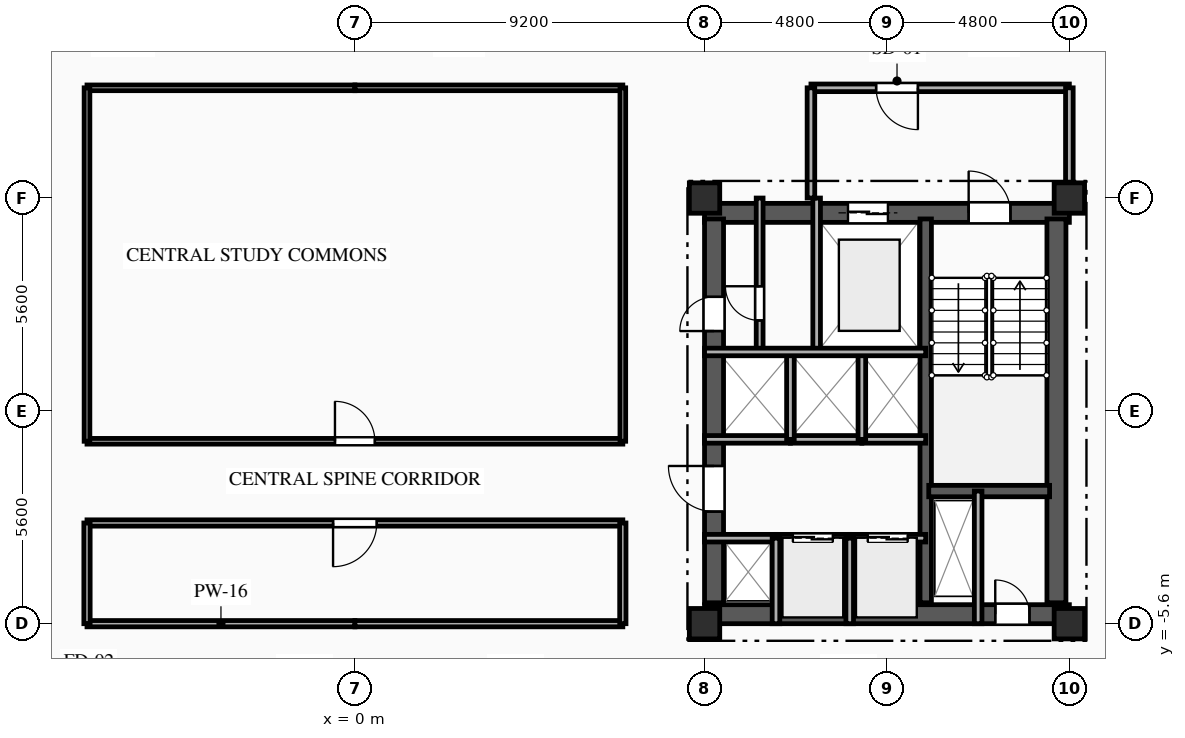
"""IFC4 building model, lengths in metres.
Left out: names, types, materials, properties, quantities, classifications, styles, units other than length and angle.
Written with IfcOpenShell. Run it as: python <this file> out.ifc"""

import sys

from ifc_helpers import new_model, si_unit, direction, frame, frame_2d, origin, origin_2d, place, context, subcontext, project, spatial, rectangle, extrude, element, fill, save


model = new_model("IFC4")
c1 = context("Model", 3, precision=1e-05, world=origin(), true_north=direction((0.0, 1.0)))
c2 = subcontext(c1, "Body", "Model", "MODEL_VIEW")
j1 = project(units=[si_unit("LENGTHUNIT", "METRE"), si_unit("PLANEANGLEUNIT", "RADIAN")], contexts=[c1])
p1 = place(None, origin())
s1 = spatial("IfcSite", under=j1, at=p1, CompositionType="ELEMENT")
p2 = place(p1, origin())
s2 = spatial("IfcBuilding", under=s1, at=p2, CompositionType="ELEMENT")
p3 = place(p2, frame((0.0, 0.0, 219.85)))
s3 = spatial("IfcBuildingStorey", under=s2, at=p3, CompositionType="ELEMENT", Elevation=219.85)
for number, where, z_axis, x_axis in (
    (1, (9.2, -5.6, 0.0), (0.0, 0.0, 1.0), (1.0, 0.0, 0.0)),
    (2, (9.2, 5.6, 0.0), (0.0, 0.0, 1.0), (1.0, 0.0, 0.0)),
    (3, (18.8, -5.6, 0.0), (0.0, 0.0, 1.0), (1.0, 0.0, 0.0)),
    (4, (18.8, 5.6, 0.0), (0.0, 0.0, 1.0), (1.0, 0.0, 0.0)),
):
    element("IfcColumn", number, at=place(p3, frame(where, z_axis=z_axis, x_axis=x_axis)), inside=s3, PredefinedType="COLUMN", context=c2, shape_type="SweptSolid", body=[
        extrude(rectangle(XDim=0.8, YDim=0.8, at=origin_2d()), origin(), (0.0, 0.0, 1.0), 3.35),
    ])
p4 = place(p3, frame((9.2, 5.21, 0.0), z_axis=(0.0, 0.0, 1.0), x_axis=(1.0, 0.0, 0.0)))
e5 = element("IfcWall", 5, at=p4, inside=s3, PredefinedType="SHEAR", context=c2, shape_type="SweptSolid", body=[
    extrude(rectangle(XDim=9.6, YDim=0.5, at=frame_2d((4.8, 0.0))), origin(), (0.0, 0.0, 1.0), 3.0),
])
p5 = place(p4, frame((6.95, 0.0, 0.0)))
e6 = element("IfcOpeningElement", 6, at=p5, cuts=e5, PredefinedType="OPENING", context=c2, shape_type="SweptSolid", body=[
    extrude(rectangle(XDim=1.1, YDim=2.15, at=frame_2d((0.55, 1.075))), frame((0.0, 0.26, 0.0), z_axis=(0.0, -1.0, 0.0), x_axis=(1.0, 0.0, 0.0)), (0.0, 0.0, 1.0), 0.52),
])
p6 = place(p4, frame((3.775, 0.0, 0.0)))
e7 = element("IfcOpeningElement", 7, at=p6, cuts=e5, PredefinedType="OPENING", context=c2, shape_type="SweptSolid", body=[
    extrude(rectangle(XDim=1.05, YDim=2.1, at=frame_2d((0.525, 1.05))), frame((0.0, 0.26, 0.0), z_axis=(0.0, -1.0, 0.0), x_axis=(1.0, 0.0, 0.0)), (0.0, 0.0, 1.0), 0.52),
])
p7 = place(p3, frame((9.2, -5.35, 0.0), z_axis=(0.0, 0.0, 1.0), x_axis=(1.0, 0.0, 0.0)))
e8 = element("IfcWall", 8, at=p7, inside=s3, PredefinedType="SHEAR", context=c2, shape_type="SweptSolid", body=[
    extrude(rectangle(XDim=9.6, YDim=0.5, at=frame_2d((4.8, 0.0))), origin(), (0.0, 0.0, 1.0), 3.0),
])
p8 = place(p7, frame((7.65, 0.0, 0.0)))
e9 = element("IfcOpeningElement", 9, at=p8, cuts=e8, PredefinedType="OPENING", context=c2, shape_type="SweptSolid", body=[
    extrude(rectangle(XDim=0.9, YDim=2.1, at=frame_2d((0.45, 1.05))), frame((0.0, 0.26, 0.0), z_axis=(0.0, -1.0, 0.0), x_axis=(1.0, 0.0, 0.0)), (0.0, 0.0, 1.0), 0.52),
])
p9 = place(p3, frame((9.45, -5.05, 0.0), z_axis=(0.0, 0.0, 1.0), x_axis=(0.0, 1.0, 0.0)))
e10 = element("IfcWall", 10, at=p9, inside=s3, PredefinedType="SHEAR", context=c2, shape_type="SweptSolid", body=[
    extrude(rectangle(XDim=10.1, YDim=0.5, at=frame_2d((5.05, 0.0))), origin(), (0.0, 0.0, 1.0), 3.0),
])
p10 = place(p9, frame((7.15, 0.0, 0.0)))
e11 = element("IfcOpeningElement", 11, at=p10, cuts=e10, PredefinedType="OPENING", context=c2, shape_type="SweptSolid", body=[
    extrude(rectangle(XDim=0.9, YDim=2.1, at=frame_2d((0.45, 1.05))), frame((0.0, 0.26, 0.0), z_axis=(0.0, -1.0, 0.0), x_axis=(1.0, 0.0, 0.0)), (0.0, 0.0, 1.0), 0.52),
])
p11 = place(p9, frame((2.4, 0.0, 0.0)))
e12 = element("IfcOpeningElement", 12, at=p11, cuts=e10, PredefinedType="OPENING", context=c2, shape_type="SweptSolid", body=[
    extrude(rectangle(XDim=1.2, YDim=2.15, at=frame_2d((0.6, 1.075))), frame((0.0, 0.26, 0.0), z_axis=(0.0, -1.0, 0.0), x_axis=(1.0, 0.0, 0.0)), (0.0, 0.0, 1.0), 0.52),
])
p12 = place(p3, frame((18.46, -5.05, 0.0), z_axis=(0.0, 0.0, 1.0), x_axis=(0.0, 1.0, 0.0)))
e13 = element("IfcWall", 13, at=p12, inside=s3, PredefinedType="SHEAR", context=c2, shape_type="SweptSolid", body=[
    extrude(rectangle(XDim=10.1, YDim=0.5, at=frame_2d((5.05, 0.0))), origin(), (0.0, 0.0, 1.0), 3.0),
])
p13 = place(p3, frame((15.02, -5.05, 0.0), z_axis=(0.0, 0.0, 1.0), x_axis=(0.0, 1.0, 0.0)))
e14 = element("IfcWall", 14, at=p13, inside=s3, PredefinedType="SHEAR", context=c2, shape_type="SweptSolid", body=[
    extrude(rectangle(XDim=10.1, YDim=0.3, at=frame_2d((5.05, 0.0))), origin(), (0.0, 0.0, 1.0), 3.0),
])
p14 = place(p3, frame((15.1, -2.11, 0.0), z_axis=(0.0, 0.0, 1.0), x_axis=(1.0, 0.0, 0.0)))
e15 = element("IfcWall", 15, at=p14, inside=s3, PredefinedType="SHEAR", context=c2, shape_type="SweptSolid", body=[
    extrude(rectangle(XDim=3.18, YDim=0.3, at=frame_2d((1.59, 0.0))), origin(), (0.0, 0.0, 1.0), 3.0),
])
p15 = place(p3, frame((16.4, -2.11, 0.0), z_axis=(0.0, 0.0, 1.0), x_axis=(0.0, -1.0, 0.0)))
e16 = element("IfcWall", 16, at=p15, inside=s3, PredefinedType="PARTITIONING", context=c2, shape_type="SweptSolid", body=[
    extrude(rectangle(XDim=3.49, YDim=0.2, at=frame_2d((1.745, 0.0))), origin(), (0.0, 0.0, 1.0), 3.0),
])
p16 = place(p3, frame((12.15, 5.6, 0.0), z_axis=(0.0, 0.0, 1.0), x_axis=(0.0, -1.0, 0.0)))
e17 = element("IfcWall", 17, at=p16, inside=s3, PredefinedType="PARTITIONING", context=c2, shape_type="SweptSolid", body=[
    extrude(rectangle(XDim=4.05, YDim=0.2, at=frame_2d((2.025, 0.0))), origin(), (0.0, 0.0, 1.0), 3.0),
])
p17 = place(p3, frame((18.8, 8.5, 0.0), z_axis=(0.0, 0.0, 1.0), x_axis=(-1.0, 0.0, 0.0)))
e18 = element("IfcWall", 18, at=p17, inside=s3, PredefinedType="PARTITIONING", context=c2, shape_type="SweptSolid", body=[
    extrude(rectangle(XDim=6.8, YDim=0.2, at=frame_2d((3.4, 0.0))), origin(), (0.0, 0.0, 1.0), 3.0),
])
p18 = place(p17, frame((3.985, 0.0, 0.0)))
e19 = element("IfcOpeningElement", 19, at=p18, cuts=e18, PredefinedType="OPENING", context=c2, shape_type="SweptSolid", body=[
    extrude(rectangle(XDim=1.1, YDim=2.15, at=frame_2d((0.55, 1.075))), frame((0.0, 0.11, 0.0), z_axis=(0.0, -1.0, 0.0), x_axis=(1.0, 0.0, 0.0)), (0.0, 0.0, 1.0), 0.22),
])
p19 = place(p3, frame((18.8, 5.6, 0.0), z_axis=(0.0, 0.0, 1.0), x_axis=(0.0, 1.0, 0.0)))
e20 = element("IfcWall", 20, at=p19, inside=s3, PredefinedType="PARTITIONING", context=c2, shape_type="SweptSolid", body=[
    extrude(rectangle(XDim=2.9, YDim=0.2, at=frame_2d((1.45, 0.0))), origin(), (0.0, 0.0, 1.0), 2.625),
])
p20 = place(p3, frame((12.0, 8.5, 0.0), z_axis=(0.0, 0.0, 1.0), x_axis=(0.0, -1.0, 0.0)))
e21 = element("IfcWall", 21, at=p20, inside=s3, PredefinedType="PARTITIONING", context=c2, shape_type="SweptSolid", body=[
    extrude(rectangle(XDim=2.9, YDim=0.2, at=frame_2d((1.45, 0.0))), origin(), (0.0, 0.0, 1.0), 3.0),
])
p21 = place(p3, frame((10.65, 1.55, 0.0), z_axis=(0.0, 0.0, 1.0), x_axis=(0.0, 1.0, 0.0)))
e22 = element("IfcWall", 22, at=p21, inside=s3, PredefinedType="PARTITIONING", context=c2, shape_type="SweptSolid", body=[
    extrude(rectangle(XDim=4.05, YDim=0.18, at=frame_2d((2.025, 0.0))), origin(), (0.0, 0.0, 1.0), 3.0),
])
p22 = place(p21, frame((0.829, 0.0, 0.0)))
e23 = element("IfcOpeningElement", 23, at=p22, cuts=e22, PredefinedType="OPENING", context=c2, shape_type="SweptSolid", body=[
    extrude(rectangle(XDim=0.9, YDim=2.1, at=frame_2d((0.45, 1.05))), frame((0.0, 0.1, 0.0), z_axis=(0.0, -1.0, 0.0), x_axis=(1.0, 0.0, 0.0)), (0.0, 0.0, 1.0), 0.2),
])
p23 = place(p3, frame((9.2, -3.35, 0.0), z_axis=(0.0, 0.0, 1.0), x_axis=(1.0, 0.0, 0.0)))
e24 = element("IfcWall", 24, at=p23, inside=s3, PredefinedType="PARTITIONING", context=c2, shape_type="SweptSolid", body=[
    extrude(rectangle(XDim=1.88, YDim=0.2, at=frame_2d((0.94, 0.0))), origin(), (0.0, 0.0, 1.0), 2.715),
])
p24 = place(p3, frame((11.08, -3.35, 0.0), z_axis=(0.0, 0.0, 1.0), x_axis=(1.0, 0.0, 0.0)))
e25 = element("IfcWall", 25, at=p24, inside=s3, PredefinedType="PARTITIONING", context=c2, shape_type="SweptSolid", body=[
    extrude(rectangle(XDim=1.94, YDim=0.2, at=frame_2d((0.97, 0.0))), origin(), (0.0, 0.0, 1.0), 3.0),
])
p25 = place(p24, frame((0.445, 0.0, 0.0)))
e26 = element("IfcOpeningElement", 26, at=p25, cuts=e25, PredefinedType="OPENING", context=c2, shape_type="SweptSolid", body=[
    extrude(rectangle(XDim=1.05, YDim=2.1, at=frame_2d((0.525, 1.05))), frame((0.0, 0.11, 0.0), z_axis=(0.0, -1.0, 0.0), x_axis=(1.0, 0.0, 0.0)), (0.0, 0.0, 1.0), 0.22),
])
p26 = place(p3, frame((13.02, -3.35, 0.0), z_axis=(0.0, 0.0, 1.0), x_axis=(1.0, 0.0, 0.0)))
e27 = element("IfcWall", 27, at=p26, inside=s3, PredefinedType="PARTITIONING", context=c2, shape_type="SweptSolid", body=[
    extrude(rectangle(XDim=2.0, YDim=0.2, at=frame_2d((1.0, 0.0))), origin(), (0.0, 0.0, 1.0), 3.0),
])
p27 = place(p26, frame((0.475, 0.0, 0.0)))
e28 = element("IfcOpeningElement", 28, at=p27, cuts=e27, PredefinedType="OPENING", context=c2, shape_type="SweptSolid", body=[
    extrude(rectangle(XDim=1.05, YDim=2.1, at=frame_2d((0.525, 1.05))), frame((0.0, 0.11, 0.0), z_axis=(0.0, -1.0, 0.0), x_axis=(1.0, 0.0, 0.0)), (0.0, 0.0, 1.0), 0.22),
])
p28 = place(p3, frame((11.46, -0.75, 0.0), z_axis=(0.0, 0.0, 1.0), x_axis=(-1.0, 0.0, 0.0)))
e29 = element("IfcWall", 29, at=p28, inside=s3, PredefinedType="PARTITIONING", context=c2, shape_type="SweptSolid", body=[
    extrude(rectangle(XDim=2.26, YDim=0.2, at=frame_2d((1.13, 0.0))), origin(), (0.0, 0.0, 1.0), 3.0),
])
p29 = place(p3, frame((13.34, -0.75, 0.0), z_axis=(0.0, 0.0, 1.0), x_axis=(-1.0, 0.0, 0.0)))
e30 = element("IfcWall", 30, at=p29, inside=s3, PredefinedType="PARTITIONING", context=c2, shape_type="SweptSolid", body=[
    extrude(rectangle(XDim=1.88, YDim=0.2, at=frame_2d((0.94, 0.0))), origin(), (0.0, 0.0, 1.0), 3.0),
])
p30 = place(p3, frame((15.02, -0.75, 0.0), z_axis=(0.0, 0.0, 1.0), x_axis=(-1.0, 0.0, 0.0)))
e31 = element("IfcWall", 31, at=p30, inside=s3, PredefinedType="PARTITIONING", context=c2, shape_type="SweptSolid", body=[
    extrude(rectangle(XDim=1.68, YDim=0.2, at=frame_2d((0.84, 0.0))), origin(), (0.0, 0.0, 1.0), 3.0),
])
for number, where, z_axis, x_axis in (
    (32, (11.08, -5.6, 0.0), (0.0, 0.0, 1.0), (0.0, 1.0, 0.0)),
    (33, (13.02, -5.6, 0.0), (0.0, 0.0, 1.0), (0.0, 1.0, 0.0)),
):
    element("IfcWall", number, at=place(p3, frame(where, z_axis=z_axis, x_axis=x_axis)), inside=s3, PredefinedType="PARTITIONING", context=c2, shape_type="SweptSolid", body=[
        extrude(rectangle(XDim=2.25, YDim=0.2, at=frame_2d((1.125, 0.0))), origin(), (0.0, 0.0, 1.0), 3.0),
    ])
for number, where, z_axis, x_axis in (
    (34, (11.46, -0.75, 0.0), (0.0, 0.0, 1.0), (0.0, 1.0, 0.0)),
    (35, (13.34, -0.75, 0.0), (0.0, 0.0, 1.0), (0.0, 1.0, 0.0)),
):
    element("IfcWall", number, at=place(p3, frame(where, z_axis=z_axis, x_axis=x_axis)), inside=s3, PredefinedType="PARTITIONING", context=c2, shape_type="SweptSolid", body=[
        extrude(rectangle(XDim=2.3, YDim=0.2, at=frame_2d((1.15, 0.0))), origin(), (0.0, 0.0, 1.0), 3.0),
    ])
for number, where, z_axis, x_axis in (
    (36, (0.0, 8.5, 0.0), (0.0, 0.0, 1.0), (-1.0, 0.0, 0.0)),
    (37, (7.05, 8.5, 0.0), (0.0, 0.0, 1.0), (-1.0, 0.0, 0.0)),
):
    element("IfcWall", number, at=place(p3, frame(where, z_axis=z_axis, x_axis=x_axis)), inside=s3, PredefinedType="PARTITIONING", context=c2, shape_type="SweptSolid", body=[
        extrude(rectangle(XDim=7.05, YDim=0.15, at=frame_2d((3.525, 0.0))), origin(), (0.0, 0.0, 1.0), 3.0),
    ])
for number, where, z_axis, x_axis in (
    (38, (-7.05, -5.6, 0.0), (0.0, 0.0, 1.0), (1.0, 0.0, 0.0)),
    (39, (0.0, -5.6, 0.0), (0.0, 0.0, 1.0), (1.0, 0.0, 0.0)),
):
    element("IfcWall", number, at=place(p3, frame(where, z_axis=z_axis, x_axis=x_axis)), inside=s3, PredefinedType="PARTITIONING", context=c2, shape_type="SweptSolid", body=[
        extrude(rectangle(XDim=7.05, YDim=0.165, at=frame_2d((3.525, 0.0))), origin(), (0.0, 0.0, 1.0), 2.485),
    ])
p31 = place(p3, frame((-7.05, -0.8, 0.0), z_axis=(0.0, 0.0, 1.0), x_axis=(1.0, 0.0, 0.0)))
e40 = element("IfcWall", 40, at=p31, inside=s3, PredefinedType="PARTITIONING", context=c2, shape_type="SweptSolid", body=[
    extrude(rectangle(XDim=14.1, YDim=0.15, at=frame_2d((7.05, 0.0))), origin(), (0.0, 0.0, 1.0), 3.0),
])
p32 = place(p31, frame((6.525, 0.0, 0.0)))
e41 = element("IfcOpeningElement", 41, at=p32, cuts=e40, PredefinedType="OPENING", context=c2, shape_type="SweptSolid", body=[
    extrude(rectangle(XDim=1.05, YDim=2.15, at=frame_2d((0.525, 1.075))), frame((0.0, 0.085, 0.0), z_axis=(0.0, -1.0, 0.0), x_axis=(1.0, 0.0, 0.0)), (0.0, 0.0, 1.0), 0.17),
])
p33 = place(p3, frame((7.05, -2.95, 0.0), z_axis=(0.0, 0.0, 1.0), x_axis=(-1.0, 0.0, 0.0)))
e42 = element("IfcWall", 42, at=p33, inside=s3, PredefinedType="PARTITIONING", context=c2, shape_type="SweptSolid", body=[
    extrude(rectangle(XDim=14.1, YDim=0.165, at=frame_2d((7.05, 0.0))), origin(), (0.0, 0.0, 1.0), 3.0),
])
p34 = place(p33, frame((6.475, 0.0, 0.0)))
e43 = element("IfcOpeningElement", 43, at=p34, cuts=e42, PredefinedType="OPENING", context=c2, shape_type="SweptSolid", body=[
    extrude(rectangle(XDim=1.15, YDim=2.15, at=frame_2d((0.575, 1.075))), frame((0.0, 0.093, 0.0), z_axis=(0.0, -1.0, 0.0), x_axis=(1.0, 0.0, 0.0)), (0.0, 0.0, 1.0), 0.185),
])
p35 = place(p3, frame((-7.05, 8.5, 0.0), z_axis=(0.0, 0.0, 1.0), x_axis=(0.0, -1.0, 0.0)))
e44 = element("IfcWall", 44, at=p35, inside=s3, PredefinedType="PARTITIONING", context=c2, shape_type="SweptSolid", body=[
    extrude(rectangle(XDim=9.3, YDim=0.15, at=frame_2d((4.65, 0.0))), origin(), (0.0, 0.0, 1.0), 3.0),
])
p36 = place(p3, frame((-7.05, -2.95, 0.0), z_axis=(0.0, 0.0, 1.0), x_axis=(0.0, -1.0, 0.0)))
e45 = element("IfcWall", 45, at=p36, inside=s3, PredefinedType="PARTITIONING", context=c2, shape_type="SweptSolid", body=[
    extrude(rectangle(XDim=2.65, YDim=0.165, at=frame_2d((1.325, 0.0))), origin(), (0.0, 0.0, 1.0), 3.0),
])
p37 = place(p3, frame((7.05, -0.8, 0.0), z_axis=(0.0, 0.0, 1.0), x_axis=(0.0, 1.0, 0.0)))
e46 = element("IfcWall", 46, at=p37, inside=s3, PredefinedType="PARTITIONING", context=c2, shape_type="SweptSolid", body=[
    extrude(rectangle(XDim=9.3, YDim=0.15, at=frame_2d((4.65, 0.0))), origin(), (0.0, 0.0, 1.0), 3.0),
])
p38 = place(p3, frame((7.05, -5.6, 0.0), z_axis=(0.0, 0.0, 1.0), x_axis=(0.0, 1.0, 0.0)))
e47 = element("IfcWall", 47, at=p38, inside=s3, PredefinedType="PARTITIONING", context=c2, shape_type="SweptSolid", body=[
    extrude(rectangle(XDim=2.65, YDim=0.165, at=frame_2d((1.325, 0.0))), origin(), (0.0, 0.0, 1.0), 3.0),
])
p39 = place(p3, frame((9.2, 1.55, 0.0), z_axis=(0.0, 0.0, 1.0), x_axis=(1.0, 0.0, 0.0)))
e48 = element("IfcWall", 48, at=p39, inside=s3, PredefinedType="PARTITIONING", context=c2, shape_type="SweptSolid", body=[
    extrude(rectangle(XDim=5.82, YDim=0.2, at=frame_2d((2.91, 0.0))), origin(), (0.0, 0.0, 1.0), 3.0),
])
p40 = place(p5, origin())
e49 = element("IfcDoor", 49, at=p40, inside=s3, OperationType="SINGLE_SWING_LEFT", PredefinedType="DOOR", context=c2, shape_type="SweptSolid", body=[
    extrude(rectangle(XDim=1.1, YDim=2.15, at=frame_2d((0.55, 1.075))), frame((0.0, 0.025, 0.0), z_axis=(0.0, -1.0, 0.0), x_axis=(1.0, 0.0, 0.0)), (0.0, 0.0, 1.0), 0.05),
])
fill(e6, e49)
p41 = place(p6, origin())
e50 = element("IfcDoor", 50, at=p41, inside=s3, OperationType="DOUBLE_DOOR_SLIDING", PredefinedType="DOOR", context=c2, shape_type="SweptSolid", body=[
    extrude(rectangle(XDim=1.05, YDim=2.1, at=frame_2d((0.525, 1.05))), frame((0.0, 0.025, 0.0), z_axis=(0.0, -1.0, 0.0), x_axis=(1.0, 0.0, 0.0)), (0.0, 0.0, 1.0), 0.05),
])
fill(e7, e50)
p42 = place(p8, origin())
e51 = element("IfcDoor", 51, at=p42, inside=s3, OperationType="SINGLE_SWING_LEFT", PredefinedType="DOOR", context=c2, shape_type="SweptSolid", body=[
    extrude(rectangle(XDim=0.9, YDim=2.1, at=frame_2d((0.45, 1.05))), frame((0.0, 0.025, 0.0), z_axis=(0.0, -1.0, 0.0), x_axis=(1.0, 0.0, 0.0)), (0.0, 0.0, 1.0), 0.05),
])
fill(e9, e51)
p43 = place(p18, origin())
e52 = element("IfcDoor", 52, at=p43, inside=s3, OperationType="SINGLE_SWING_LEFT", PredefinedType="DOOR", context=c2, shape_type="SweptSolid", body=[
    extrude(rectangle(XDim=1.1, YDim=2.15, at=frame_2d((0.55, 1.075))), frame((0.0, 0.025, 0.0), z_axis=(0.0, -1.0, 0.0), x_axis=(1.0, 0.0, 0.0)), (0.0, 0.0, 1.0), 0.05),
])
fill(e19, e52)
p44 = place(p22, origin())
e53 = element("IfcDoor", 53, at=p44, inside=s3, OperationType="SINGLE_SWING_RIGHT", PredefinedType="DOOR", context=c2, shape_type="SweptSolid", body=[
    extrude(rectangle(XDim=0.9, YDim=2.1, at=frame_2d((0.45, 1.05))), frame((0.0, 0.025, 0.0), z_axis=(0.0, -1.0, 0.0), x_axis=(1.0, 0.0, 0.0)), (0.0, 0.0, 1.0), 0.05),
])
fill(e23, e53)
p45 = place(p10, origin())
e54 = element("IfcDoor", 54, at=p45, inside=s3, OperationType="SINGLE_SWING_LEFT", PredefinedType="DOOR", context=c2, shape_type="SweptSolid", body=[
    extrude(rectangle(XDim=0.9, YDim=2.1, at=frame_2d((0.45, 1.05))), frame((0.0, 0.025, 0.0), z_axis=(0.0, -1.0, 0.0), x_axis=(1.0, 0.0, 0.0)), (0.0, 0.0, 1.0), 0.05),
])
fill(e11, e54)
p46 = place(p25, origin())
e55 = element("IfcDoor", 55, at=p46, inside=s3, OperationType="DOUBLE_DOOR_SLIDING", PredefinedType="DOOR", context=c2, shape_type="SweptSolid", body=[
    extrude(rectangle(XDim=1.05, YDim=2.1, at=frame_2d((0.525, 1.05))), frame((0.0, 0.025, 0.0), z_axis=(0.0, -1.0, 0.0), x_axis=(1.0, 0.0, 0.0)), (0.0, 0.0, 1.0), 0.05),
])
fill(e26, e55)
p47 = place(p27, origin())
e56 = element("IfcDoor", 56, at=p47, inside=s3, OperationType="DOUBLE_DOOR_SLIDING", PredefinedType="DOOR", context=c2, shape_type="SweptSolid", body=[
    extrude(rectangle(XDim=1.05, YDim=2.1, at=frame_2d((0.525, 1.05))), frame((0.0, 0.025, 0.0), z_axis=(0.0, -1.0, 0.0), x_axis=(1.0, 0.0, 0.0)), (0.0, 0.0, 1.0), 0.05),
])
fill(e28, e56)
p48 = place(p11, origin())
e57 = element("IfcDoor", 57, at=p48, inside=s3, OperationType="SINGLE_SWING_RIGHT", PredefinedType="DOOR", context=c2, shape_type="SweptSolid", body=[
    extrude(rectangle(XDim=1.2, YDim=2.15, at=frame_2d((0.6, 1.075))), frame((0.0, 0.025, 0.0), z_axis=(0.0, -1.0, 0.0), x_axis=(1.0, 0.0, 0.0)), (0.0, 0.0, 1.0), 0.05),
])
fill(e12, e57)
p49 = place(p32, origin())
e58 = element("IfcDoor", 58, at=p49, inside=s3, OperationType="SINGLE_SWING_LEFT", PredefinedType="DOOR", context=c2, shape_type="SweptSolid", body=[
    extrude(rectangle(XDim=1.05, YDim=2.15, at=frame_2d((0.525, 1.075))), frame((0.0, 0.025, 0.0), z_axis=(0.0, -1.0, 0.0), x_axis=(1.0, 0.0, 0.0)), (0.0, 0.0, 1.0), 0.05),
])
fill(e41, e58)
p50 = place(p34, origin())
e59 = element("IfcDoor", 59, at=p50, inside=s3, OperationType="SINGLE_SWING_RIGHT", PredefinedType="DOOR", context=c2, shape_type="SweptSolid", body=[
    extrude(rectangle(XDim=1.15, YDim=2.15, at=frame_2d((0.575, 1.075))), frame((0.0, 0.025, 0.0), z_axis=(0.0, -1.0, 0.0), x_axis=(1.0, 0.0, 0.0)), (0.0, 0.0, 1.0), 0.05),
])
fill(e43, e59)
save(model, sys.argv[1])
